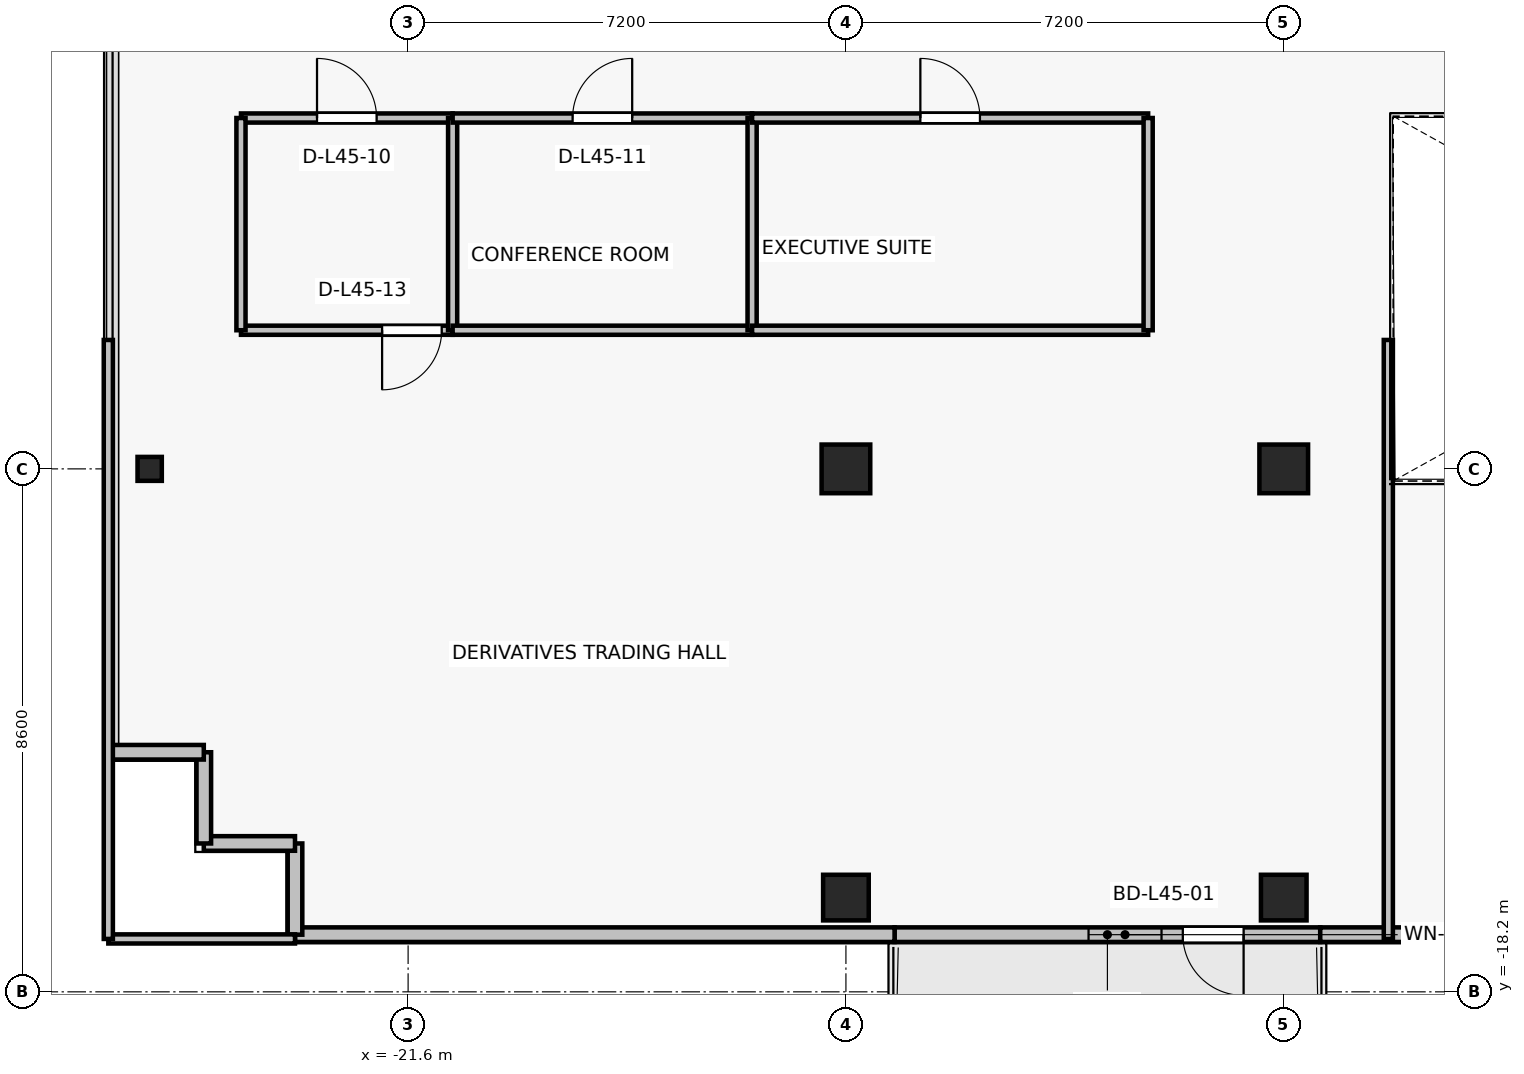
"""IFC4 building model, lengths in metres.
Left out: names, types, materials, properties, quantities, classifications, styles, units other than length and angle.
Written with IfcOpenShell. Run it as: python <this file> out.ifc"""

import sys

from ifc_helpers import new_model, si_unit, direction, frame, frame_2d, origin, origin_2d, place, context, subcontext, project, spatial, rectangle, i_section, extrude, source, transform, mapped, element, fill, save


model = new_model("IFC4")
c1 = context("Model", 3, precision=1e-05, world=origin(), true_north=direction((0.0, 1.0)))
c2 = subcontext(c1, "Body", "Model", "MODEL_VIEW")
j1 = project(units=[si_unit("LENGTHUNIT", "METRE"), si_unit("PLANEANGLEUNIT", "RADIAN")], contexts=[c1])
p1 = place(None, origin())
s1 = spatial("IfcSite", under=j1, at=p1, CompositionType="ELEMENT")
p2 = place(p1, origin())
s2 = spatial("IfcBuilding", under=s1, at=p2, CompositionType="ELEMENT")
p3 = place(p2, frame((0.0, 0.0, 162.7)))
s3 = spatial("IfcBuildingStorey", under=s2, at=p3, CompositionType="ELEMENT", Elevation=162.7)
for number, where, z_axis, x_axis in (
    (1, (-14.4, -9.6, 0.0), (0.0, 0.0, 1.0), (1.0, 0.0, 0.0)),
    (2, (-7.2, -9.6, 0.0), (0.0, 0.0, 1.0), (1.0, 0.0, 0.0)),
):
    element("IfcColumn", number, at=place(p3, frame(where, z_axis=z_axis, x_axis=x_axis)), inside=s3, PredefinedType="COLUMN", context=c2, shape_type="SweptSolid", body=[
        extrude(rectangle(XDim=0.8, YDim=0.8, at=origin_2d()), origin(), (0.0, 0.0, 1.0), 3.3),
    ])
for number, where, z_axis, x_axis in (
    (3, (-14.4, -16.65, 0.0), (0.0, 0.0, 1.0), (1.0, 0.0, 0.0)),
    (4, (-7.2, -16.65, 0.0), (0.0, 0.0, 1.0), (1.0, 0.0, 0.0)),
):
    element("IfcColumn", number, at=place(p3, frame(where, z_axis=z_axis, x_axis=x_axis)), inside=s3, PredefinedType="COLUMN", context=c2, shape_type="SweptSolid", body=[
        extrude(rectangle(XDim=0.75, YDim=0.75, at=origin_2d()), origin(), (0.0, 0.0, 1.0), 3.3),
    ])
p4 = place(p3, frame((-25.85, -9.6, 0.0), z_axis=(0.0, 0.0, 1.0), x_axis=(1.0, 0.0, 0.0)))
e5 = element("IfcColumn", 5, at=p4, inside=s3, PredefinedType="COLUMN", context=c2, shape_type="SweptSolid", body=[
    extrude(i_section(OverallWidth=0.399, OverallDepth=0.394, WebThickness=0.023, FlangeThickness=0.037, FilletRadius=0.015, at=origin_2d()), origin(), (0.0, 0.0, 1.0), 3.3),
])
p5 = place(p3, frame((-6.6, -17.26, 0.0), z_axis=(0.0, 0.0, 1.0), x_axis=(-1.0, 0.0, 0.0)))
e6 = element("IfcWall", 6, at=p5, inside=s3, PredefinedType="SOLIDWALL", context=c2, shape_type="SweptSolid", body=[
    extrude(rectangle(XDim=7.0, YDim=0.24, at=frame_2d((3.5, 0.0))), origin(), (0.0, 0.0, 1.0), 2.665),
])
p6 = place(p5, frame((1.26, 0.0, 0.0)))
e7 = element("IfcOpeningElement", 7, at=p6, cuts=e6, PredefinedType="OPENING", context=c2, shape_type="SweptSolid", body=[
    extrude(rectangle(XDim=1.0, YDim=2.2, at=frame_2d((0.5, 1.1))), frame((0.0, 0.13, 0.0), z_axis=(0.0, -1.0, 0.0), x_axis=(1.0, 0.0, 0.0)), (0.0, 0.0, 1.0), 0.26),
])
p7 = place(p5, frame((2.61, 0.0, 0.85)))
e8 = element("IfcOpeningElement", 8, at=p7, cuts=e6, PredefinedType="OPENING", context=c2, shape_type="SweptSolid", body=[
    extrude(rectangle(XDim=1.2, YDim=1.5, at=frame_2d((0.6, 0.75))), frame((0.0, 0.13, 0.0), z_axis=(0.0, -1.0, 0.0), x_axis=(1.0, 0.0, 0.0)), (0.0, 0.0, 1.0), 0.26),
])
p8 = place(p3, frame((-6.6, -17.26, 0.0), z_axis=(0.0, 0.0, 1.0), x_axis=(1.0, 0.0, 0.0)))
e9 = element("IfcWall", 9, at=p8, inside=s3, PredefinedType="SOLIDWALL", context=c2, shape_type="SweptSolid", body=[
    extrude(rectangle(XDim=3.4, YDim=0.24, at=frame_2d((1.7, 0.0))), origin(), (0.0, 0.0, 1.0), 3.075),
])
p9 = place(p3, frame((-23.46, -17.26, 0.0), z_axis=(0.0, 0.0, 1.0), x_axis=(1.0, 0.0, 0.0)))
e10 = element("IfcWall", 10, at=p9, inside=s3, PredefinedType="SOLIDWALL", context=c2, shape_type="SweptSolid", body=[
    extrude(rectangle(XDim=9.86, YDim=0.24, at=frame_2d((4.93, 0.0))), origin(), (0.0, 0.0, 1.0), 2.665),
])
for number, where, z_axis, x_axis in (
    (11, (-23.46, -15.76, 0.0), (0.0, 0.0, 1.0), (0.0, -1.0, 0.0)),
    (12, (-24.96, -15.76, 0.0), (0.0, 0.0, 1.0), (1.0, 0.0, 0.0)),
    (13, (-24.96, -14.26, 0.0), (0.0, 0.0, 1.0), (0.0, -1.0, 0.0)),
    (14, (-26.46, -14.26, 0.0), (0.0, 0.0, 1.0), (1.0, 0.0, 0.0)),
):
    element("IfcWall", number, at=place(p3, frame(where, z_axis=z_axis, x_axis=x_axis)), inside=s3, PredefinedType="SOLIDWALL", context=c2, shape_type="SweptSolid", body=[
        extrude(rectangle(XDim=1.5, YDim=0.24, at=frame_2d((0.75, 0.0))), origin(), (0.0, 0.0, 1.0), 3.075),
    ])
p10 = place(p3, frame((-20.868, -7.32, 0.0), z_axis=(0.0, 0.0, 1.0), x_axis=(-1.0, 0.0, 0.0)))
e15 = element("IfcWall", 15, at=p10, inside=s3, PredefinedType="PARTITIONING", context=c2, shape_type="SweptSolid", body=[
    extrude(rectangle(XDim=3.481, YDim=0.15, at=frame_2d((1.74, 0.0))), origin(), (0.0, 0.0, 1.0), 3.075),
])
p11 = place(p10, frame((0.18, 0.0, 0.0)))
e16 = element("IfcOpeningElement", 16, at=p11, cuts=e15, PredefinedType="OPENING", context=c2, shape_type="SweptSolid", body=[
    extrude(rectangle(XDim=0.98, YDim=2.15, at=frame_2d((0.49, 1.075))), frame((0.0, 0.085, 0.0), z_axis=(0.0, -1.0, 0.0), x_axis=(1.0, 0.0, 0.0)), (0.0, 0.0, 1.0), 0.17),
])
p12 = place(p3, frame((-24.349, -3.83, 0.0), z_axis=(0.0, 0.0, 1.0), x_axis=(1.0, 0.0, 0.0)))
e17 = element("IfcWall", 17, at=p12, inside=s3, PredefinedType="PARTITIONING", context=c2, shape_type="SweptSolid", body=[
    extrude(rectangle(XDim=3.481, YDim=0.15, at=frame_2d((1.74, 0.0))), origin(), (0.0, 0.0, 1.0), 3.075),
])
p13 = place(p12, frame((1.25, 0.0, 0.0)))
e18 = element("IfcOpeningElement", 18, at=p13, cuts=e17, PredefinedType="OPENING", context=c2, shape_type="SweptSolid", body=[
    extrude(rectangle(XDim=0.98, YDim=2.15, at=frame_2d((0.49, 1.075))), frame((0.0, 0.085, 0.0), z_axis=(0.0, -1.0, 0.0), x_axis=(1.0, 0.0, 0.0)), (0.0, 0.0, 1.0), 0.17),
])
for number, where, z_axis, x_axis in (
    (19, (-24.349, -7.32, 0.0), (0.0, 0.0, 1.0), (0.0, 1.0, 0.0)),
    (20, (-20.868, -3.83, 0.0), (0.0, 0.0, 1.0), (0.0, -1.0, 0.0)),
):
    element("IfcWall", number, at=place(p3, frame(where, z_axis=z_axis, x_axis=x_axis)), inside=s3, PredefinedType="PARTITIONING", context=c2, shape_type="SweptSolid", body=[
        extrude(rectangle(XDim=3.49, YDim=0.15, at=frame_2d((1.745, 0.0))), origin(), (0.0, 0.0, 1.0), 3.075),
    ])
p14 = place(p3, frame((-15.943, -7.32, 0.0), z_axis=(0.0, 0.0, 1.0), x_axis=(-1.0, 0.0, 0.0)))
e21 = element("IfcWall", 21, at=p14, inside=s3, PredefinedType="PARTITIONING", context=c2, shape_type="SweptSolid", body=[
    extrude(rectangle(XDim=4.925, YDim=0.15, at=frame_2d((2.462, 0.0))), origin(), (0.0, 0.0, 1.0), 3.075),
])
p15 = place(p3, frame((-20.868, -3.83, 0.0), z_axis=(0.0, 0.0, 1.0), x_axis=(1.0, 0.0, 0.0)))
e22 = element("IfcWall", 22, at=p15, inside=s3, PredefinedType="PARTITIONING", context=c2, shape_type="SweptSolid", body=[
    extrude(rectangle(XDim=4.925, YDim=0.15, at=frame_2d((2.462, 0.0))), origin(), (0.0, 0.0, 1.0), 3.075),
])
p16 = place(p15, frame((1.973, 0.0, 0.0)))
e23 = element("IfcOpeningElement", 23, at=p16, cuts=e22, PredefinedType="OPENING", context=c2, shape_type="SweptSolid", body=[
    extrude(rectangle(XDim=0.98, YDim=2.15, at=frame_2d((0.49, 1.075))), frame((0.0, 0.085, 0.0), z_axis=(0.0, -1.0, 0.0), x_axis=(1.0, 0.0, 0.0)), (0.0, 0.0, 1.0), 0.17),
])
p17 = place(p3, frame((-15.943, -3.83, 0.0), z_axis=(0.0, 0.0, 1.0), x_axis=(0.0, -1.0, 0.0)))
e24 = element("IfcWall", 24, at=p17, inside=s3, PredefinedType="PARTITIONING", context=c2, shape_type="SweptSolid", body=[
    extrude(rectangle(XDim=3.49, YDim=0.15, at=frame_2d((1.745, 0.0))), origin(), (0.0, 0.0, 1.0), 3.075),
])
p18 = place(p3, frame((-9.43, -7.32, 0.0), z_axis=(0.0, 0.0, 1.0), x_axis=(-1.0, 0.0, 0.0)))
e25 = element("IfcWall", 25, at=p18, inside=s3, PredefinedType="PARTITIONING", context=c2, shape_type="SweptSolid", body=[
    extrude(rectangle(XDim=6.513, YDim=0.15, at=frame_2d((3.257, 0.0))), origin(), (0.0, 0.0, 1.0), 2.565),
])
p19 = place(p3, frame((-15.943, -3.83, 0.0), z_axis=(0.0, 0.0, 1.0), x_axis=(1.0, 0.0, 0.0)))
e26 = element("IfcWall", 26, at=p19, inside=s3, PredefinedType="PARTITIONING", context=c2, shape_type="SweptSolid", body=[
    extrude(rectangle(XDim=6.513, YDim=0.15, at=frame_2d((3.257, 0.0))), origin(), (0.0, 0.0, 1.0), 2.565),
])
p20 = place(p19, frame((2.767, 0.0, 0.0)))
e27 = element("IfcOpeningElement", 27, at=p20, cuts=e26, PredefinedType="OPENING", context=c2, shape_type="SweptSolid", body=[
    extrude(rectangle(XDim=0.98, YDim=2.15, at=frame_2d((0.49, 1.075))), frame((0.0, 0.085, 0.0), z_axis=(0.0, -1.0, 0.0), x_axis=(1.0, 0.0, 0.0)), (0.0, 0.0, 1.0), 0.17),
])
p21 = place(p3, frame((-9.43, -3.83, 0.0), z_axis=(0.0, 0.0, 1.0), x_axis=(0.0, -1.0, 0.0)))
e28 = element("IfcWall", 28, at=p21, inside=s3, PredefinedType="PARTITIONING", context=c2, shape_type="SweptSolid", body=[
    extrude(rectangle(XDim=3.49, YDim=0.15, at=frame_2d((1.745, 0.0))), origin(), (0.0, 0.0, 1.0), 2.665),
])
p22 = place(p3, frame((-23.46, -17.33, 0.0), z_axis=(0.0, 0.0, 1.0), x_axis=(-1.0, 0.0, 0.0)))
e29 = element("IfcWall", 29, at=p22, inside=s3, PredefinedType="PARTITIONING", context=c2, shape_type="SweptSolid", body=[
    extrude(rectangle(XDim=3.07, YDim=0.15, at=frame_2d((1.535, 0.0))), origin(), (0.0, 0.0, 1.0), 2.665),
])
p23 = place(p3, frame((-26.53, -17.33, 0.0), z_axis=(0.0, 0.0, 1.0), x_axis=(0.0, 1.0, 0.0)))
e30 = element("IfcWall", 30, at=p23, inside=s3, PredefinedType="PARTITIONING", context=c2, shape_type="SweptSolid", body=[
    extrude(rectangle(XDim=9.85, YDim=0.15, at=frame_2d((4.925, 0.0))), origin(), (0.0, 0.0, 1.0), 2.665),
])
p24 = place(p3, frame((-5.48, -7.48, 0.0), z_axis=(0.0, 0.0, 1.0), x_axis=(0.0, -1.0, 0.0)))
e31 = element("IfcWall", 31, at=p24, inside=s3, PredefinedType="PARTITIONING", context=c2, shape_type="SweptSolid", body=[
    extrude(rectangle(XDim=9.85, YDim=0.15, at=frame_2d((4.925, 0.0))), origin(), (0.0, 0.0, 1.0), 2.565),
])
m1 = source(origin(), c2, "Body", "SweptSolid", [
    extrude(rectangle(XDim=1.0, YDim=2.2, at=frame_2d((0.5, 1.1))), frame((0.0, 0.025, 0.0), z_axis=(0.0, -1.0, 0.0), x_axis=(1.0, 0.0, 0.0)), (0.0, 0.0, 1.0), 0.05),
])
p25 = place(p6, origin())
e32 = element("IfcDoor", 32, at=p25, inside=s3, OperationType="SINGLE_SWING_LEFT", PredefinedType="DOOR", context=c2, shape_type="MappedRepresentation", body=[
    mapped(m1, transform((0.0, 0.0, 0.0), x_axis=(1.0, 0.0, 0.0), y_axis=(0.0, 1.0, 0.0), z_axis=(0.0, 0.0, 1.0), scale=1.0)),
])
fill(e7, e32)
m2 = source(origin(), c2, "Body", "SweptSolid", [
    extrude(rectangle(XDim=1.2, YDim=1.5, at=frame_2d((0.6, 0.75))), frame((0.0, 0.03, 0.0), z_axis=(0.0, -1.0, 0.0), x_axis=(1.0, 0.0, 0.0)), (0.0, 0.0, 1.0), 0.06),
])
p26 = place(p7, origin())
e33 = element("IfcWindow", 33, at=p26, inside=s3, PartitioningType="SINGLE_PANEL", PredefinedType="WINDOW", context=c2, shape_type="MappedRepresentation", body=[
    mapped(m2, transform((0.0, 0.0, 0.0), x_axis=(1.0, 0.0, 0.0), y_axis=(0.0, 1.0, 0.0), z_axis=(0.0, 0.0, 1.0), scale=1.0)),
])
fill(e8, e33)
m3 = source(origin(), c2, "Body", "SweptSolid", [
    extrude(rectangle(XDim=0.98, YDim=2.15, at=frame_2d((0.49, 1.075))), frame((0.0, 0.025, 0.0), z_axis=(0.0, -1.0, 0.0), x_axis=(1.0, 0.0, 0.0)), (0.0, 0.0, 1.0), 0.05),
])
p27 = place(p13, origin())
e34 = element("IfcDoor", 34, at=p27, inside=s3, OperationType="SINGLE_SWING_LEFT", PredefinedType="DOOR", context=c2, shape_type="MappedRepresentation", body=[
    mapped(m3, transform((0.0, 0.0, 0.0), x_axis=(1.0, 0.0, 0.0), y_axis=(0.0, 1.0, 0.0), z_axis=(0.0, 0.0, 1.0), scale=1.0)),
])
fill(e18, e34)
p28 = place(p16, origin())
e35 = element("IfcDoor", 35, at=p28, inside=s3, OperationType="SINGLE_SWING_RIGHT", PredefinedType="DOOR", context=c2, shape_type="MappedRepresentation", body=[
    mapped(m3, transform((0.0, 0.0, 0.0), x_axis=(1.0, 0.0, 0.0), y_axis=(0.0, 1.0, 0.0), z_axis=(0.0, 0.0, 1.0), scale=1.0)),
])
fill(e23, e35)
p29 = place(p20, origin())
e36 = element("IfcDoor", 36, at=p29, inside=s3, OperationType="SINGLE_SWING_LEFT", PredefinedType="DOOR", context=c2, shape_type="MappedRepresentation", body=[
    mapped(m3, transform((0.0, 0.0, 0.0), x_axis=(1.0, 0.0, 0.0), y_axis=(0.0, 1.0, 0.0), z_axis=(0.0, 0.0, 1.0), scale=1.0)),
])
fill(e27, e36)
p30 = place(p11, origin())
e37 = element("IfcDoor", 37, at=p30, inside=s3, OperationType="SINGLE_SWING_RIGHT", PredefinedType="DOOR", context=c2, shape_type="MappedRepresentation", body=[
    mapped(m3, transform((0.0, 0.0, 0.0), x_axis=(1.0, 0.0, 0.0), y_axis=(0.0, 1.0, 0.0), z_axis=(0.0, 0.0, 1.0), scale=1.0)),
])
fill(e16, e37)
save(model, sys.argv[1])
